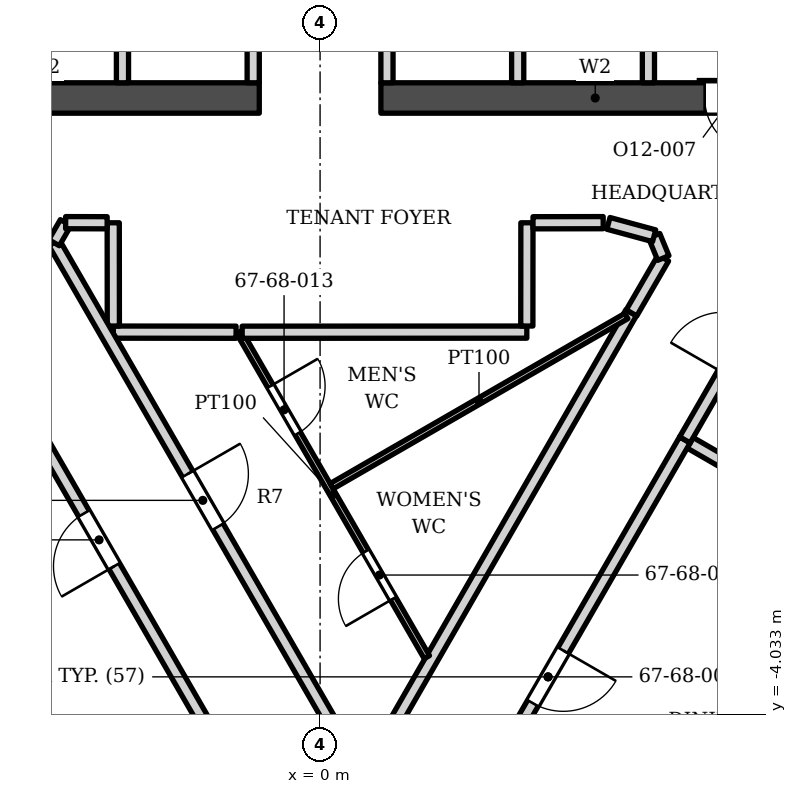
"""IFC4 building model, lengths in metres.
Left out: names, types, materials, properties, quantities, classifications, styles, units other than length and angle.
Written with IfcOpenShell. Run it as: python <this file> out.ifc"""

import sys

from ifc_helpers import new_model, si_unit, direction, frame, frame_2d, origin, place, context, subcontext, project, spatial, rectangle, extrude, element, fill, save


model = new_model("IFC4")
c1 = context("Model", 3, precision=1e-05, world=origin(), true_north=direction((0.0, 1.0)))
c2 = subcontext(c1, "Body", "Model", "MODEL_VIEW")
j1 = project(units=[si_unit("LENGTHUNIT", "METRE"), si_unit("PLANEANGLEUNIT", "RADIAN")], contexts=[c1])
p1 = place(None, origin())
s1 = spatial("IfcSite", under=j1, at=p1, CompositionType="ELEMENT")
p2 = place(p1, origin())
s2 = spatial("IfcBuilding", under=s1, at=p2, CompositionType="ELEMENT")
p3 = place(p2, frame((0.0, 0.0, 279.4)))
s3 = spatial("IfcBuildingStorey", under=s2, at=p3, CompositionType="ELEMENT", Elevation=279.4)
p4 = place(p3, frame((-8.05, 6.103, 0.0), z_axis=(0.0, 0.0, 1.0), x_axis=(1.0, 0.0, 0.0)))
e1 = element("IfcWall", 1, at=p4, inside=s3, PredefinedType="SHEAR", context=c2, shape_type="SweptSolid", body=[
    extrude(rectangle(XDim=7.05, YDim=0.5, at=frame_2d((3.525, 0.0))), origin(), (0.0, 0.0, 1.0), 3.9),
])
p5 = place(p4, frame((0.825, 0.0, 0.0)))
e2 = element("IfcOpeningElement", 2, at=p5, cuts=e1, PredefinedType="OPENING", context=c2, shape_type="SweptSolid", body=[
    extrude(rectangle(XDim=0.9, YDim=2.1, at=frame_2d((0.45, 1.05))), frame((0.0, 0.26, 0.0), z_axis=(0.0, -1.0, 0.0), x_axis=(1.0, 0.0, 0.0)), (0.0, 0.0, 1.0), 0.52),
])
p6 = place(p3, frame((1.0, 6.103, 0.0), z_axis=(0.0, 0.0, 1.0), x_axis=(1.0, 0.0, 0.0)))
e3 = element("IfcWall", 3, at=p6, inside=s3, PredefinedType="SHEAR", context=c2, shape_type="SweptSolid", body=[
    extrude(rectangle(XDim=7.05, YDim=0.5, at=frame_2d((3.525, 0.0))), origin(), (0.0, 0.0, 1.0), 3.9),
])
p7 = place(p6, frame((5.325, 0.0, 0.0)))
e4 = element("IfcOpeningElement", 4, at=p7, cuts=e3, PredefinedType="OPENING", context=c2, shape_type="SweptSolid", body=[
    extrude(rectangle(XDim=0.9, YDim=2.1, at=frame_2d((0.45, 1.05))), frame((0.0, 0.26, 0.0), z_axis=(0.0, -1.0, 0.0), x_axis=(1.0, 0.0, 0.0)), (0.0, 0.0, 1.0), 0.52),
])
for number, where, z_axis, x_axis in (
    (5, (-3.25, 6.353, 0.0), (0.0, 0.0, 1.0), (0.0, 1.0, 0.0)),
    (6, (-1.1, 6.353, 0.0), (0.0, 0.0, 1.0), (0.0, 1.0, 0.0)),
    (7, (1.1, 6.353, 0.0), (0.0, 0.0, 1.0), (0.0, 1.0, 0.0)),
    (8, (3.25, 6.353, 0.0), (0.0, 0.0, 1.0), (0.0, 1.0, 0.0)),
    (9, (5.4, 6.353, 0.0), (0.0, 0.0, 1.0), (0.0, 1.0, 0.0)),
):
    element("IfcWall", number, at=place(p3, frame(where, z_axis=z_axis, x_axis=x_axis)), inside=s3, PredefinedType="SOLIDWALL", context=c2, shape_type="SweptSolid", body=[
        extrude(rectangle(XDim=2.5, YDim=0.2, at=frame_2d((1.25, 0.0))), origin(), (0.0, 0.0, 1.0), 3.73),
    ])
p8 = place(p3, frame((-5.885, 2.733, 0.0), z_axis=(0.0, 0.0, 1.0), x_axis=(0.499999199346, -0.866025866042, 0.0)))
e10 = element("IfcWall", 10, at=p8, inside=s3, PredefinedType="PARTITIONING", context=c2, shape_type="SweptSolid", body=[
    extrude(rectangle(XDim=12.04, YDim=0.2, at=frame_2d((6.02, 0.0))), origin(), (0.0, 0.0, 1.0), 2.884),
])
p9 = place(p8, frame((4.0, 0.0, 0.0)))
e11 = element("IfcOpeningElement", 11, at=p9, cuts=e10, PredefinedType="OPENING", context=c2, shape_type="SweptSolid", body=[
    extrude(rectangle(XDim=1.0, YDim=2.4, at=frame_2d((0.5, 1.2))), frame((0.0, 0.11, 0.0), z_axis=(0.0, -1.0, 0.0), x_axis=(1.0, 0.0, 0.0)), (0.0, 0.0, 1.0), 0.22),
])
p10 = place(p8, frame((9.52, 0.0, 0.0)))
e12 = element("IfcOpeningElement", 12, at=p10, cuts=e10, PredefinedType="OPENING", context=c2, shape_type="SweptSolid", body=[
    extrude(rectangle(XDim=1.8, YDim=2.4, at=frame_2d((0.9, 1.2))), frame((0.0, 0.11, 0.0), z_axis=(0.0, -1.0, 0.0), x_axis=(1.0, 0.0, 0.0)), (0.0, 0.0, 1.0), 0.22),
])
p11 = place(p3, frame((0.898, -4.751, 0.0), z_axis=(0.0, 0.0, 1.0), x_axis=(0.499141293918, 0.866520610664, 0.0)))
e13 = element("IfcWall", 13, at=p11, inside=s3, PredefinedType="PARTITIONING", context=c2, shape_type="SweptSolid", body=[
    extrude(rectangle(XDim=8.451, YDim=0.2, at=frame_2d((4.226, 0.0))), origin(), (0.0, 0.0, 1.0), 2.884),
])
p12 = place(p3, frame((6.086, 0.433, 0.0), z_axis=(0.0, 0.0, 1.0), x_axis=(0.866035557451, -0.499982412921, 0.0)))
e14 = element("IfcWall", 14, at=p12, inside=s3, PredefinedType="PARTITIONING", context=c2, shape_type="SweptSolid", body=[
    extrude(rectangle(XDim=6.449, YDim=0.2, at=frame_2d((3.225, 0.0))), origin(), (0.0, 0.0, 1.0), 3.052),
])
p13 = place(p3, frame((1.5, -7.314, 0.0), z_axis=(0.0, 0.0, 1.0), x_axis=(0.499990139034, 0.866031096941, 0.0)))
e15 = element("IfcWall", 15, at=p13, inside=s3, PredefinedType="PARTITIONING", context=c2, shape_type="SweptSolid", body=[
    extrude(rectangle(XDim=9.0, YDim=0.2, at=frame_2d((4.5, 0.0))), origin(), (0.0, 0.0, 1.0), 2.884),
])
p14 = place(p13, frame((4.0, 0.0, 0.0)))
e16 = element("IfcOpeningElement", 16, at=p14, cuts=e15, PredefinedType="OPENING", context=c2, shape_type="SweptSolid", body=[
    extrude(rectangle(XDim=1.0, YDim=2.1, at=frame_2d((0.5, 1.05))), frame((0.0, 0.11, 0.0), z_axis=(0.0, -1.0, 0.0), x_axis=(1.0, 0.0, 0.0)), (0.0, 0.0, 1.0), 0.22),
])
p15 = place(p3, frame((-3.4, 2.252, 0.0), z_axis=(0.0, 0.0, 1.0), x_axis=(0.999999531889, -0.00096758542, 0.0)))
e17 = element("IfcWall", 17, at=p15, inside=s3, PredefinedType="PARTITIONING", context=c2, shape_type="SweptSolid", body=[
    extrude(rectangle(XDim=2.019, YDim=0.2, at=frame_2d((1.009, 0.0))), origin(), (0.0, 0.0, 1.0), 3.73),
])
p16 = place(p3, frame((-1.33, 2.252, 0.0), z_axis=(0.0, 0.0, 1.0), x_axis=(0.499984964964, -0.866034084092, 0.0)))
e18 = element("IfcWall", 18, at=p16, inside=s3, PredefinedType="PARTITIONING", context=c2, shape_type="SweptSolid", body=[
    extrude(rectangle(XDim=6.172, YDim=0.1, at=frame_2d((3.086, 0.0))), origin(), (0.0, 0.0, 1.0), 2.884),
])
p17 = place(p16, frame((1.026, 0.0, 0.0)))
e19 = element("IfcOpeningElement", 19, at=p17, cuts=e18, PredefinedType="OPENING", context=c2, shape_type="SweptSolid", body=[
    extrude(rectangle(XDim=0.9, YDim=2.1, at=frame_2d((0.45, 1.05))), frame((0.0, 0.06, 0.0), z_axis=(0.0, -1.0, 0.0), x_axis=(1.0, 0.0, 0.0)), (0.0, 0.0, 1.0), 0.12),
])
p18 = place(p16, frame((4.163, 0.0, 0.0)))
e20 = element("IfcOpeningElement", 20, at=p18, cuts=e18, PredefinedType="OPENING", context=c2, shape_type="SweptSolid", body=[
    extrude(rectangle(XDim=0.9, YDim=2.1, at=frame_2d((0.45, 1.05))), frame((0.0, 0.06, 0.0), z_axis=(0.0, -1.0, 0.0), x_axis=(1.0, 0.0, 0.0)), (0.0, 0.0, 1.0), 0.12),
])
p19 = place(p3, frame((-1.281, 2.25, 0.0), z_axis=(0.0, 0.0, 1.0), x_axis=(0.999999912959, 0.000417231632, 0.0)))
e21 = element("IfcWall", 21, at=p19, inside=s3, PredefinedType="PARTITIONING", context=c2, shape_type="SweptSolid", body=[
    extrude(rectangle(XDim=4.681, YDim=0.2, at=frame_2d((2.341, 0.0))), origin(), (0.0, 0.0, 1.0), 3.73),
])
p20 = place(p3, frame((-3.402, 4.051, 0.0), z_axis=(0.0, 0.0, 1.0), x_axis=(0.001150085496, -0.999999338651, 0.0)))
e22 = element("IfcWall", 22, at=p20, inside=s3, PredefinedType="PARTITIONING", context=c2, shape_type="SweptSolid", body=[
    extrude(rectangle(XDim=1.698, YDim=0.2, at=frame_2d((0.849, 0.0))), origin(), (0.0, 0.0, 1.0), 3.73),
])
p21 = place(p3, frame((0.19, -0.281, 0.0), z_axis=(0.0, 0.0, 1.0), x_axis=(0.866035935605, 0.499981757907, 0.0)))
e23 = element("IfcWall", 23, at=p21, inside=s3, PredefinedType="PARTITIONING", context=c2, shape_type="SweptSolid", body=[
    extrude(rectangle(XDim=5.596, YDim=0.1, at=frame_2d((2.798, 0.0))), origin(), (0.0, 0.0, 1.0), 2.884),
])
p22 = place(p3, frame((5.122, 2.569, 0.0), z_axis=(0.0, 0.0, 1.0), x_axis=(0.501525356051, 0.86514294613, 0.0)))
e24 = element("IfcWall", 24, at=p22, inside=s3, PredefinedType="PARTITIONING", context=c2, shape_type="SweptSolid", body=[
    extrude(rectangle(XDim=1.043, YDim=0.2, at=frame_2d((0.521, 0.0))), origin(), (0.0, 0.0, 1.0), 3.73),
])
p23 = place(p3, frame((5.494, 3.837, 0.0), z_axis=(0.0, 0.0, 1.0), x_axis=(0.381462580175, -0.924384281523, 0.0)))
e25 = element("IfcWall", 25, at=p23, inside=s3, PredefinedType="PARTITIONING", context=c2, shape_type="SweptSolid", body=[
    extrude(rectangle(XDim=0.396, YDim=0.2, at=frame_2d((0.198, 0.0))), origin(), (0.0, 0.0, 1.0), 3.73),
])
p24 = place(p3, frame((6.0, 0.481, 0.0), z_axis=(0.0, 0.0, 1.0), x_axis=(0.499648797631, 0.866228075639, 0.0)))
e26 = element("IfcWall", 26, at=p24, inside=s3, PredefinedType="PARTITIONING", context=c2, shape_type="SweptSolid", body=[
    extrude(rectangle(XDim=3.539, YDim=0.2, at=frame_2d((1.77, 0.0))), origin(), (0.0, 0.0, 1.0), 3.73),
])
p25 = place(p24, frame((1.27, 0.0, 0.0)))
e27 = element("IfcOpeningElement", 27, at=p25, cuts=e26, PredefinedType="OPENING", context=c2, shape_type="SweptSolid", body=[
    extrude(rectangle(XDim=1.0, YDim=2.4, at=frame_2d((0.5, 1.2))), frame((0.0, 0.11, 0.0), z_axis=(0.0, -1.0, 0.0), x_axis=(1.0, 0.0, 0.0)), (0.0, 0.0, 1.0), 0.22),
])
p26 = place(p3, frame((-4.375, 3.723, 0.0), z_axis=(0.0, 0.0, 1.0), x_axis=(0.499984508542, -0.866034347597, 0.0)))
e28 = element("IfcWall", 28, at=p26, inside=s3, PredefinedType="PARTITIONING", context=c2, shape_type="SweptSolid", body=[
    extrude(rectangle(XDim=9.785, YDim=0.2, at=frame_2d((4.893, 0.0))), origin(), (0.0, 0.0, 1.0), 2.884),
])
p27 = place(p26, frame((4.393, 0.0, 0.0)))
e29 = element("IfcOpeningElement", 29, at=p27, cuts=e28, PredefinedType="OPENING", context=c2, shape_type="SweptSolid", body=[
    extrude(rectangle(XDim=1.0, YDim=2.1, at=frame_2d((0.5, 1.05))), frame((0.0, 0.11, 0.0), z_axis=(0.0, -1.0, 0.0), x_axis=(1.0, 0.0, 0.0)), (0.0, 0.0, 1.0), 0.22),
])
p28 = place(p3, frame((4.742, 4.041, 0.0), z_axis=(0.0, 0.0, 1.0), x_axis=(0.965081274591, -0.261950631675, 0.0)))
e30 = element("IfcWall", 30, at=p28, inside=s3, PredefinedType="PARTITIONING", context=c2, shape_type="SweptSolid", body=[
    extrude(rectangle(XDim=0.779, YDim=0.2, at=frame_2d((0.39, 0.0))), origin(), (0.0, 0.0, 1.0), 3.73),
])
p29 = place(p3, frame((-4.375, 3.723, 0.0), z_axis=(0.0, 0.0, 1.0), x_axis=(0.499999897272, 0.866025463095, 0.0)))
e31 = element("IfcWall", 31, at=p29, inside=s3, PredefinedType="PARTITIONING", context=c2, shape_type="SweptSolid", body=[
    extrude(rectangle(XDim=0.381, YDim=0.2, at=frame_2d((0.19, 0.0))), origin(), (0.0, 0.0, 1.0), 2.884),
])
p30 = place(p3, frame((-4.185, 4.052, 0.0), z_axis=(0.0, 0.0, 1.0), x_axis=(0.999996866067, -0.002503568692, 0.0)))
e32 = element("IfcWall", 32, at=p30, inside=s3, PredefinedType="PARTITIONING", context=c2, shape_type="SweptSolid", body=[
    extrude(rectangle(XDim=0.683, YDim=0.2, at=frame_2d((0.341, 0.0))), origin(), (0.0, 0.0, 1.0), 3.73),
])
p31 = place(p3, frame((3.4, 2.352, 0.0), z_axis=(0.0, 0.0, 1.0), x_axis=(0.001150085496, 0.999999338651, 0.0)))
e33 = element("IfcWall", 33, at=p31, inside=s3, PredefinedType="PARTITIONING", context=c2, shape_type="SweptSolid", body=[
    extrude(rectangle(XDim=1.698, YDim=0.2, at=frame_2d((0.849, 0.0))), origin(), (0.0, 0.0, 1.0), 3.73),
])
p32 = place(p3, frame((3.502, 4.051, 0.0), z_axis=(0.0, 0.0, 1.0), x_axis=(0.999998904, 0.001480539832, 0.0)))
e34 = element("IfcWall", 34, at=p32, inside=s3, PredefinedType="PARTITIONING", context=c2, shape_type="SweptSolid", body=[
    extrude(rectangle(XDim=1.154, YDim=0.2, at=frame_2d((0.577, 0.0))), origin(), (0.0, 0.0, 1.0), 3.73),
])
p33 = place(p7, origin())
e35 = element("IfcDoor", 35, at=p33, inside=s3, OperationType="SINGLE_SWING_RIGHT", PredefinedType="DOOR", context=c2, shape_type="SweptSolid", body=[
    extrude(rectangle(XDim=0.9, YDim=2.1, at=frame_2d((0.45, 1.05))), frame((0.0, 0.025, 0.0), z_axis=(0.0, -1.0, 0.0), x_axis=(1.0, 0.0, 0.0)), (0.0, 0.0, 1.0), 0.05),
])
fill(e4, e35)
p34 = place(p9, origin())
e36 = element("IfcDoor", 36, at=p34, inside=s3, OperationType="SINGLE_SWING_RIGHT", PredefinedType="DOOR", context=c2, shape_type="SweptSolid", body=[
    extrude(rectangle(XDim=1.0, YDim=2.4, at=frame_2d((0.5, 1.2))), frame((0.0, 0.025, 0.0), z_axis=(0.0, -1.0, 0.0), x_axis=(1.0, 0.0, 0.0)), (0.0, 0.0, 1.0), 0.05),
])
fill(e11, e36)
p35 = place(p14, origin())
e37 = element("IfcDoor", 37, at=p35, inside=s3, OperationType="SINGLE_SWING_RIGHT", PredefinedType="DOOR", context=c2, shape_type="SweptSolid", body=[
    extrude(rectangle(XDim=1.0, YDim=2.1, at=frame_2d((0.5, 1.05))), frame((0.0, 0.025, 0.0), z_axis=(0.0, -1.0, 0.0), x_axis=(1.0, 0.0, 0.0)), (0.0, 0.0, 1.0), 0.05),
])
fill(e16, e37)
p36 = place(p27, origin())
e38 = element("IfcDoor", 38, at=p36, inside=s3, OperationType="SINGLE_SWING_LEFT", PredefinedType="DOOR", context=c2, shape_type="SweptSolid", body=[
    extrude(rectangle(XDim=1.0, YDim=2.1, at=frame_2d((0.5, 1.05))), frame((0.0, 0.025, 0.0), z_axis=(0.0, -1.0, 0.0), x_axis=(1.0, 0.0, 0.0)), (0.0, 0.0, 1.0), 0.05),
])
fill(e29, e38)
p37 = place(p17, origin())
e39 = element("IfcDoor", 39, at=p37, inside=s3, OperationType="SINGLE_SWING_LEFT", PredefinedType="DOOR", context=c2, shape_type="SweptSolid", body=[
    extrude(rectangle(XDim=0.9, YDim=2.1, at=frame_2d((0.45, 1.05))), frame((0.0, 0.025, 0.0), z_axis=(0.0, -1.0, 0.0), x_axis=(1.0, 0.0, 0.0)), (0.0, 0.0, 1.0), 0.05),
])
fill(e19, e39)
p38 = place(p18, origin())
e40 = element("IfcDoor", 40, at=p38, inside=s3, OperationType="SINGLE_SWING_RIGHT", PredefinedType="DOOR", context=c2, shape_type="SweptSolid", body=[
    extrude(rectangle(XDim=0.9, YDim=2.1, at=frame_2d((0.45, 1.05))), frame((0.0, 0.025, 0.0), z_axis=(0.0, -1.0, 0.0), x_axis=(1.0, 0.0, 0.0)), (0.0, 0.0, 1.0), 0.05),
])
fill(e20, e40)
save(model, sys.argv[1])
